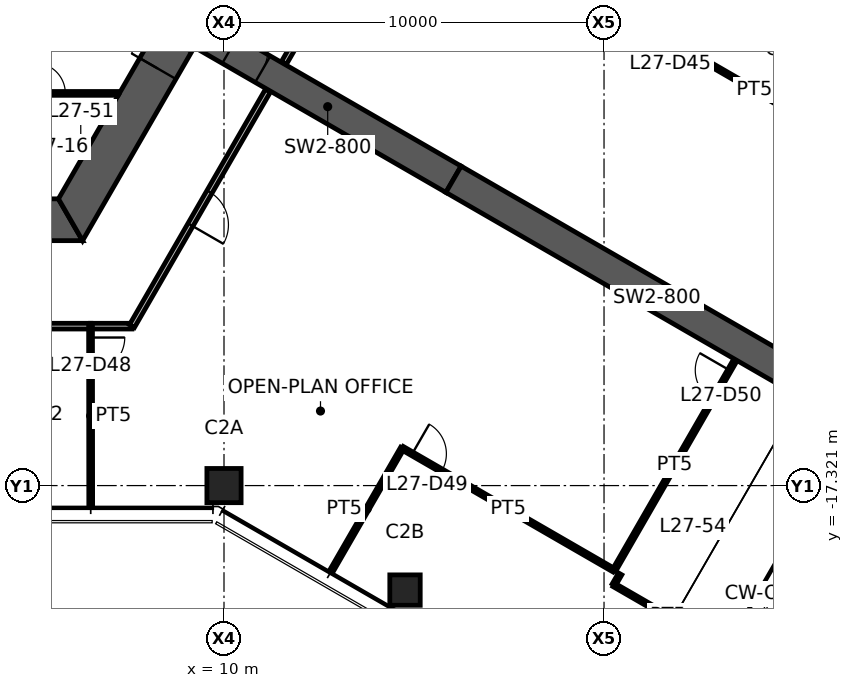
"""IFC4 building model, lengths in metres.
Left out: names, types, materials, properties, quantities, classifications, styles, units other than length and angle.
Written with IfcOpenShell. Run it as: python <this file> out.ifc"""

import sys

from ifc_helpers import new_model, si_unit, direction, frame, frame_2d, origin, origin_2d, place, context, subcontext, project, spatial, polyline, rectangle, hollow_rectangle, outline, extrude, element, fill, save


model = new_model("IFC4")
c1 = context("Model", 3, precision=1e-05, world=origin(), true_north=direction((0.0, 1.0)))
c2 = subcontext(c1, "Body", "Model", "MODEL_VIEW")
j1 = project(units=[si_unit("LENGTHUNIT", "METRE"), si_unit("PLANEANGLEUNIT", "RADIAN")], contexts=[c1])
p1 = place(None, origin())
s1 = spatial("IfcSite", under=j1, at=p1, CompositionType="ELEMENT")
p2 = place(p1, origin())
s2 = spatial("IfcBuilding", under=s1, at=p2, CompositionType="ELEMENT")
p3 = place(p2, frame((0.0, 0.0, 108.0)))
s3 = spatial("IfcBuildingStorey", under=s2, at=p3, CompositionType="ELEMENT", Elevation=108.0)
p4 = place(p3, frame((10.0, -17.321, 0.0), z_axis=(0.0, 0.0, 1.0), x_axis=(1.0, 0.0, 0.0)))
e1 = element("IfcColumn", 1, at=p4, inside=s3, PredefinedType="COLUMN", context=c2, shape_type="SweptSolid", body=[
    extrude(hollow_rectangle(XDim=0.9, YDim=0.9, WallThickness=0.055, at=origin_2d()), origin(), (0.0, 0.0, 1.0), 3.9),
])
p5 = place(p3, frame((14.763, -20.071, 0.0), z_axis=(0.0, 0.0, 1.0), x_axis=(1.0, 0.0, 0.0)))
e2 = element("IfcColumn", 2, at=p5, inside=s3, PredefinedType="COLUMN", context=c2, shape_type="SweptSolid", body=[
    extrude(hollow_rectangle(XDim=0.8, YDim=0.8, WallThickness=0.045, at=origin_2d()), origin(), (0.0, 0.0, 1.0), 3.9),
])
p6 = place(p3, frame((-5.961, -10.325, 0.0), z_axis=(0.0, 0.0, 1.0), x_axis=(1.0, 0.0, 0.0)))
e3 = element("IfcWall", 3, at=p6, inside=s3, PredefinedType="SHEAR", context=c2, shape_type="SweptSolid", body=[
    extrude(outline(polyline([(-0.318, -0.55), (5.461, -0.55), (6.461, -0.55), (12.24, -0.55), (11.605, 0.55), (6.461, 0.55), (5.461, 0.55), (0.318, 0.55), (-0.318, -0.55)])), origin(), (0.0, 0.0, 1.0), 3.9),
])
p7 = place(p6, frame((5.461, 0.0, 0.0)))
e4 = element("IfcOpeningElement", 4, at=p7, cuts=e3, PredefinedType="OPENING", context=c2, shape_type="SweptSolid", body=[
    extrude(rectangle(XDim=1.0, YDim=2.1, at=frame_2d((0.5, 1.05))), frame((0.0, 0.56, 0.0), z_axis=(0.0, -1.0, 0.0), x_axis=(1.0, 0.0, 0.0)), (0.0, 0.0, 1.0), 1.12),
])
p8 = place(p3, frame((5.961, -10.325, 0.0), z_axis=(0.0, 0.0, 1.0), x_axis=(0.500004296715, 0.866022923061, 0.0)))
e5 = element("IfcWall", 5, at=p8, inside=s3, PredefinedType="SHEAR", context=c2, shape_type="SweptSolid", body=[
    extrude(outline(polyline([(-0.318, -0.55), (4.594, -0.55), (5.394, -0.55), (12.24, -0.55), (11.605, 0.55), (5.394, 0.55), (4.594, 0.55), (0.318, 0.55), (-0.318, -0.55)])), origin(), (0.0, 0.0, 1.0), 3.9),
])
p9 = place(p8, frame((4.594, 0.0, 0.0)))
e6 = element("IfcOpeningElement", 6, at=p9, cuts=e5, PredefinedType="OPENING", context=c2, shape_type="SweptSolid", body=[
    extrude(rectangle(XDim=0.8, YDim=2.1, at=frame_2d((0.4, 1.05))), frame((0.0, 0.56, 0.0), z_axis=(0.0, -1.0, 0.0), x_axis=(1.0, 0.0, 0.0)), (0.0, 0.0, 1.0), 1.12),
])
p10 = place(p3, frame((9.418, -5.438, 0.0), z_axis=(0.0, 0.0, 1.0), x_axis=(0.866029782078, -0.499992416496, 0.0)))
e7 = element("IfcWall", 7, at=p10, inside=s3, PredefinedType="SHEAR", context=c2, shape_type="SweptSolid", body=[
    extrude(rectangle(XDim=7.646, YDim=0.8, at=frame_2d((3.823, 0.0))), origin(), (0.0, 0.0, 1.0), 3.9),
])
p11 = place(p10, frame((0.85, 0.0, 0.0)))
e8 = element("IfcOpeningElement", 8, at=p11, cuts=e7, PredefinedType="OPENING", context=c2, shape_type="SweptSolid", body=[
    extrude(rectangle(XDim=1.0, YDim=2.1, at=frame_2d((0.5, 1.05))), frame((0.0, 0.41, 0.0), z_axis=(0.0, -1.0, 0.0), x_axis=(1.0, 0.0, 0.0)), (0.0, 0.0, 1.0), 0.82),
])
p12 = place(p3, frame((16.039, -9.26, 0.0), z_axis=(0.0, 0.0, 1.0), x_axis=(0.866024837091, -0.50000098154, 0.0)))
e9 = element("IfcWall", 9, at=p12, inside=s3, PredefinedType="SHEAR", context=c2, shape_type="SweptSolid", body=[
    extrude(rectangle(XDim=13.0, YDim=0.8, at=frame_2d((6.5, 0.0))), origin(), (0.0, 0.0, 1.0), 3.9),
])
p13 = place(p3, frame((4.675, -7.0, 0.0), z_axis=(0.0, 0.0, 1.0), x_axis=(1.0, 0.0, 0.0)))
e10 = element("IfcWall", 10, at=p13, inside=s3, PredefinedType="PARTITIONING", context=c2, shape_type="SweptSolid", body=[
    extrude(outline(polyline([(0.0, -0.05), (0.35, -0.05), (1.15, -0.05), (2.542, -0.05), (2.571, 0.0), (2.577, 0.05), (1.15, 0.05), (0.35, 0.05), (0.0, 0.05), (0.0, -0.05)])), origin(), (0.0, 0.0, 1.0), 2.95),
])
p14 = place(p13, frame((0.35, 0.0, 0.0)))
e11 = element("IfcOpeningElement", 11, at=p14, cuts=e10, PredefinedType="OPENING", context=c2, shape_type="SweptSolid", body=[
    extrude(rectangle(XDim=0.8, YDim=2.1, at=frame_2d((0.4, 1.05))), frame((0.0, 0.06, 0.0), z_axis=(0.0, -1.0, 0.0), x_axis=(1.0, 0.0, 0.0)), (0.0, 0.0, 1.0), 0.12),
])
p15 = place(p3, frame((15.144, -0.02, 0.0), z_axis=(0.0, 0.0, 1.0), x_axis=(-0.499985098601, -0.86603400694, 0.0)))
e12 = element("IfcWall", 12, at=p15, inside=s3, PredefinedType="PARTITIONING", context=c2, shape_type="SweptSolid", body=[
    extrude(rectangle(XDim=7.135, YDim=0.15, at=frame_2d((3.567, 0.0))), origin(), (0.0, 0.0, 1.0), 2.95),
])
p16 = place(p15, frame((3.067, 0.0, 0.0)))
e13 = element("IfcOpeningElement", 13, at=p16, cuts=e12, PredefinedType="OPENING", context=c2, shape_type="SweptSolid", body=[
    extrude(rectangle(XDim=1.0, YDim=2.1, at=frame_2d((0.5, 1.05))), frame((0.0, 0.085, 0.0), z_axis=(0.0, -1.0, 0.0), x_axis=(1.0, 0.0, 0.0)), (0.0, 0.0, 1.0), 0.17),
])
p17 = place(p3, frame((26.825, -8.559, 0.0), z_axis=(0.0, 0.0, 1.0), x_axis=(-0.866037567856, 0.499978930619, 0.0)))
e14 = element("IfcWall", 14, at=p17, inside=s3, PredefinedType="PARTITIONING", context=c2, shape_type="SweptSolid", body=[
    extrude(rectangle(XDim=6.619, YDim=0.1, at=frame_2d((3.31, 0.0))), origin(), (0.0, 0.0, 1.0), 2.95),
])
p18 = place(p17, frame((5.42, 0.0, 0.0)))
e15 = element("IfcOpeningElement", 15, at=p18, cuts=e14, PredefinedType="OPENING", context=c2, shape_type="SweptSolid", body=[
    extrude(rectangle(XDim=0.9, YDim=2.1, at=frame_2d((0.45, 1.05))), frame((0.0, 0.06, 0.0), z_axis=(0.0, -1.0, 0.0), x_axis=(1.0, 0.0, 0.0)), (0.0, 0.0, 1.0), 0.12),
])
p19 = place(p3, frame((6.498, -13.125, 0.0), z_axis=(0.0, 0.0, 1.0), x_axis=(-1.0, 0.0, 0.0)))
e16 = element("IfcWall", 16, at=p19, inside=s3, PredefinedType="PARTITIONING", context=c2, shape_type="SweptSolid", body=[
    extrude(rectangle(XDim=3.256, YDim=0.15, at=frame_2d((1.628, 0.0))), origin(), (0.0, 0.0, 1.0), 2.95),
])
p20 = place(p3, frame((7.578, -13.125, 0.0), z_axis=(0.0, 0.0, 1.0), x_axis=(-1.0, 0.0, 0.0)))
e17 = element("IfcWall", 17, at=p20, inside=s3, PredefinedType="PARTITIONING", context=c2, shape_type="SweptSolid", body=[
    extrude(rectangle(XDim=1.089, YDim=0.15, at=frame_2d((0.545, 0.0))), origin(), (0.0, 0.0, 1.0), 2.95),
])
p21 = place(p3, frame((11.156, -6.926, 0.0), z_axis=(0.0, 0.0, 1.0), x_axis=(-0.500001961223, -0.866024271469, 0.0)))
e18 = element("IfcWall", 18, at=p21, inside=s3, PredefinedType="PARTITIONING", context=c2, shape_type="SweptSolid", body=[
    extrude(rectangle(XDim=7.158, YDim=0.15, at=frame_2d((3.579, 0.0))), origin(), (0.0, 0.0, 1.0), 2.95),
])
p22 = place(p21, frame((3.079, 0.0, 0.0)))
e19 = element("IfcOpeningElement", 19, at=p22, cuts=e18, PredefinedType="OPENING", context=c2, shape_type="SweptSolid", body=[
    extrude(rectangle(XDim=1.0, YDim=2.1, at=frame_2d((0.5, 1.05))), frame((0.0, 0.085, 0.0), z_axis=(0.0, -1.0, 0.0), x_axis=(1.0, 0.0, 0.0)), (0.0, 0.0, 1.0), 0.17),
])
p23 = place(p3, frame((6.488, -13.125, 0.0), z_axis=(0.0, 0.0, 1.0), x_axis=(0.000982673433, -0.999999517176, 0.0)))
e20 = element("IfcWall", 20, at=p23, inside=s3, PredefinedType="PARTITIONING", context=c2, shape_type="SweptSolid", body=[
    extrude(rectangle(XDim=4.72, YDim=0.1, at=frame_2d((2.36, 0.0))), origin(), (0.0, 0.0, 1.0), 2.95),
])
p24 = place(p23, frame((0.3, 0.0, 0.0)))
e21 = element("IfcOpeningElement", 21, at=p24, cuts=e20, PredefinedType="OPENING", context=c2, shape_type="SweptSolid", body=[
    extrude(rectangle(XDim=0.9, YDim=2.1, at=frame_2d((0.45, 1.05))), frame((0.0, 0.06, 0.0), z_axis=(0.0, -1.0, 0.0), x_axis=(1.0, 0.0, 0.0)), (0.0, 0.0, 1.0), 0.12),
])
p25 = place(p3, frame((20.258, -19.933, 0.0), z_axis=(0.0, 0.0, 1.0), x_axis=(0.866015045157, -0.50001794124, 0.0)))
e22 = element("IfcWall", 22, at=p25, inside=s3, PredefinedType="PARTITIONING", context=c2, shape_type="SweptSolid", body=[
    extrude(rectangle(XDim=3.29, YDim=0.1, at=frame_2d((1.645, 0.0))), origin(), (0.0, 0.0, 1.0), 2.95),
])
p26 = place(p3, frame((20.425, -19.644, 0.0), z_axis=(0.0, 0.0, 1.0), x_axis=(-0.500228859883, -0.865893231143, 0.0)))
e23 = element("IfcWall", 23, at=p26, inside=s3, PredefinedType="PARTITIONING", context=c2, shape_type="SweptSolid", body=[
    extrude(rectangle(XDim=0.334, YDim=0.1, at=frame_2d((0.167, 0.0))), origin(), (0.0, 0.0, 1.0), 2.95),
])
p27 = place(p3, frame((12.842, -19.539, 0.0), z_axis=(0.0, 0.0, 1.0), x_axis=(0.499964254978, 0.866046040199, 0.0)))
e24 = element("IfcWall", 24, at=p27, inside=s3, PredefinedType="PARTITIONING", context=c2, shape_type="SweptSolid", body=[
    extrude(rectangle(XDim=3.7, YDim=0.1, at=frame_2d((1.85, 0.0))), origin(), (0.0, 0.0, 1.0), 2.95),
])
p28 = place(p3, frame((14.692, -16.334, 0.0), z_axis=(0.0, 0.0, 1.0), x_axis=(0.866023188807, -0.500003836433, 0.0)))
e25 = element("IfcWall", 25, at=p28, inside=s3, PredefinedType="PARTITIONING", context=c2, shape_type="SweptSolid", body=[
    extrude(rectangle(XDim=6.434, YDim=0.1, at=frame_2d((3.217, 0.0))), origin(), (0.0, 0.0, 1.0), 2.95),
])
p29 = place(p28, frame((0.3, 0.0, 0.0)))
e26 = element("IfcOpeningElement", 26, at=p29, cuts=e25, PredefinedType="OPENING", context=c2, shape_type="SweptSolid", body=[
    extrude(rectangle(XDim=0.9, YDim=2.1, at=frame_2d((0.45, 1.05))), frame((0.0, 0.06, 0.0), z_axis=(0.0, -1.0, 0.0), x_axis=(1.0, 0.0, 0.0)), (0.0, 0.0, 1.0), 0.12),
])
p30 = place(p3, frame((20.264, -19.552, 0.0), z_axis=(0.0, 0.0, 1.0), x_axis=(0.499374576797, 0.866386191054, 0.0)))
e27 = element("IfcWall", 27, at=p30, inside=s3, PredefinedType="PARTITIONING", context=c2, shape_type="SweptSolid", body=[
    extrude(rectangle(XDim=6.38, YDim=0.1, at=frame_2d((3.19, 0.0))), origin(), (0.0, 0.0, 1.0), 2.95),
])
p31 = place(p30, frame((5.18, 0.0, 0.0)))
e28 = element("IfcOpeningElement", 28, at=p31, cuts=e27, PredefinedType="OPENING", context=c2, shape_type="SweptSolid", body=[
    extrude(rectangle(XDim=0.9, YDim=2.1, at=frame_2d((0.45, 1.05))), frame((0.0, 0.06, 0.0), z_axis=(0.0, -1.0, 0.0), x_axis=(1.0, 0.0, 0.0)), (0.0, 0.0, 1.0), 0.12),
])
p32 = place(p9, origin())
e29 = element("IfcDoor", 29, at=p32, inside=s3, OperationType="SINGLE_SWING_LEFT", PredefinedType="DOOR", context=c2, shape_type="SweptSolid", body=[
    extrude(rectangle(XDim=0.8, YDim=2.1, at=frame_2d((0.4, 1.05))), frame((0.0, 0.025, 0.0), z_axis=(0.0, -1.0, 0.0), x_axis=(1.0, 0.0, 0.0)), (0.0, 0.0, 1.0), 0.05),
])
fill(e6, e29)
p33 = place(p11, origin())
e30 = element("IfcDoor", 30, at=p33, inside=s3, OperationType="SINGLE_SWING_LEFT", PredefinedType="DOOR", context=c2, shape_type="SweptSolid", body=[
    extrude(rectangle(XDim=1.0, YDim=2.1, at=frame_2d((0.5, 1.05))), frame((0.0, 0.025, 0.0), z_axis=(0.0, -1.0, 0.0), x_axis=(1.0, 0.0, 0.0)), (0.0, 0.0, 1.0), 0.05),
])
fill(e8, e30)
p34 = place(p14, origin())
e31 = element("IfcDoor", 31, at=p34, inside=s3, OperationType="SINGLE_SWING_LEFT", PredefinedType="DOOR", context=c2, shape_type="SweptSolid", body=[
    extrude(rectangle(XDim=0.8, YDim=2.1, at=frame_2d((0.4, 1.05))), frame((0.0, 0.025, 0.0), z_axis=(0.0, -1.0, 0.0), x_axis=(1.0, 0.0, 0.0)), (0.0, 0.0, 1.0), 0.05),
])
fill(e11, e31)
p35 = place(p22, origin())
e32 = element("IfcDoor", 32, at=p35, inside=s3, OperationType="SINGLE_SWING_RIGHT", PredefinedType="DOOR", context=c2, shape_type="SweptSolid", body=[
    extrude(rectangle(XDim=1.0, YDim=2.1, at=frame_2d((0.5, 1.05))), frame((0.0, 0.025, 0.0), z_axis=(0.0, -1.0, 0.0), x_axis=(1.0, 0.0, 0.0)), (0.0, 0.0, 1.0), 0.05),
])
fill(e19, e32)
p36 = place(p24, origin())
e33 = element("IfcDoor", 33, at=p36, inside=s3, OperationType="SINGLE_SWING_LEFT", PredefinedType="DOOR", context=c2, shape_type="SweptSolid", body=[
    extrude(rectangle(XDim=0.9, YDim=2.1, at=frame_2d((0.45, 1.05))), frame((0.0, 0.025, 0.0), z_axis=(0.0, -1.0, 0.0), x_axis=(1.0, 0.0, 0.0)), (0.0, 0.0, 1.0), 0.05),
])
fill(e21, e33)
p37 = place(p29, origin())
e34 = element("IfcDoor", 34, at=p37, inside=s3, OperationType="SINGLE_SWING_LEFT", PredefinedType="DOOR", context=c2, shape_type="SweptSolid", body=[
    extrude(rectangle(XDim=0.9, YDim=2.1, at=frame_2d((0.45, 1.05))), frame((0.0, 0.025, 0.0), z_axis=(0.0, -1.0, 0.0), x_axis=(1.0, 0.0, 0.0)), (0.0, 0.0, 1.0), 0.05),
])
fill(e26, e34)
p38 = place(p31, origin())
e35 = element("IfcDoor", 35, at=p38, inside=s3, OperationType="SINGLE_SWING_RIGHT", PredefinedType="DOOR", context=c2, shape_type="SweptSolid", body=[
    extrude(rectangle(XDim=0.9, YDim=2.1, at=frame_2d((0.45, 1.05))), frame((0.0, 0.025, 0.0), z_axis=(0.0, -1.0, 0.0), x_axis=(1.0, 0.0, 0.0)), (0.0, 0.0, 1.0), 0.05),
])
fill(e28, e35)
save(model, sys.argv[1])
